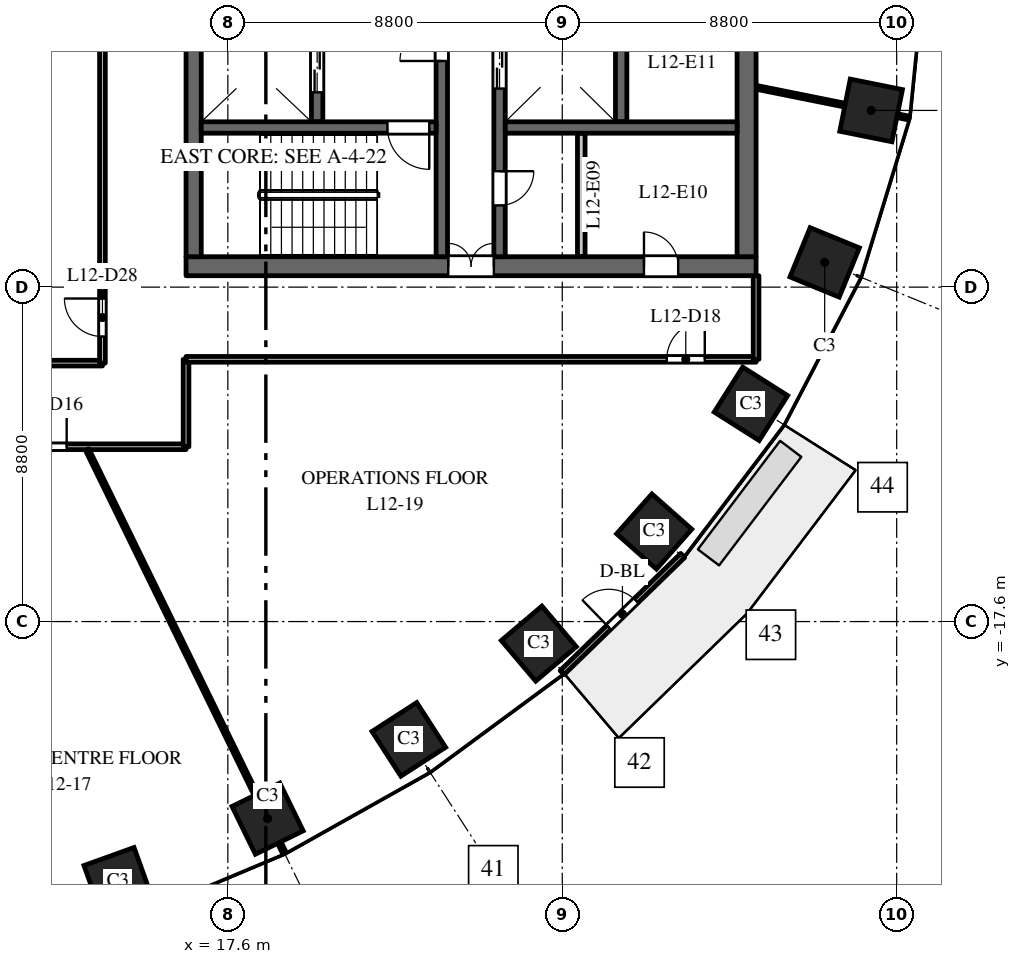
"""IFC4 building model, lengths in metres.
Left out: names, types, materials, properties, quantities, classifications, styles, units other than length and angle.
Written with IfcOpenShell. Run it as: python <this file> out.ifc"""

import sys

from ifc_helpers import new_model, si_unit, direction, frame, frame_2d, origin, origin_2d, place, context, subcontext, project, spatial, rectangle, extrude, element, fill, save


model = new_model("IFC4")
c1 = context("Model", 3, precision=1e-05, world=origin(), true_north=direction((0.0, 1.0)))
c2 = subcontext(c1, "Body", "Model", "MODEL_VIEW")
j1 = project(units=[si_unit("LENGTHUNIT", "METRE"), si_unit("PLANEANGLEUNIT", "RADIAN")], contexts=[c1])
p1 = place(None, origin())
s1 = spatial("IfcSite", under=j1, at=p1, CompositionType="ELEMENT")
p2 = place(p1, origin())
s2 = spatial("IfcBuilding", under=s1, at=p2, CompositionType="ELEMENT")
p3 = place(p2, frame((0.0, 0.0, 58.5)))
s3 = spatial("IfcBuildingStorey", under=s2, at=p3, CompositionType="ELEMENT", Elevation=58.5)
for number, where, z_axis, x_axis in (
    (1, (14.709, -24.441, 0.0), (0.0, 0.0, 1.0), (0.941, 0.338, 0.0)),
    (2, (18.646, -22.785, 0.0), (0.0, 0.0, 1.0), (0.898, 0.439, 0.0)),
    (3, (22.362, -20.7, 0.0), (0.0, 0.0, 1.0), (0.84, 0.542, 0.0)),
    (4, (25.783, -18.18, 0.0), (0.0, 0.0, 1.0), (0.763, 0.646, 0.0)),
    (5, (28.819, -15.23, 0.0), (0.0, 0.0, 1.0), (0.663, 0.749, 0.0)),
    (6, (31.365, -11.871, 0.0), (0.0, 0.0, 1.0), (0.535, 0.845, 0.0)),
    (7, (33.305, -8.149, 0.0), (0.0, 0.0, 1.0), (0.379, 0.925, 0.0)),
    (8, (34.527, -4.151, 0.0), (0.0, 0.0, 1.0), (0.197, 0.98, 0.0)),
):
    element("IfcColumn", number, at=place(p3, frame(where, z_axis=z_axis, x_axis=x_axis)), inside=s3, PredefinedType="COLUMN", context=c2, shape_type="SweptSolid", body=[
        extrude(rectangle(XDim=1.4, YDim=1.4, at=origin_2d()), origin(), (0.0, 0.0, 1.0), 4.0),
    ])
p4 = place(p3, frame((16.5, -8.25, 0.0), z_axis=(0.0, 0.0, 1.0), x_axis=(1.0, 0.0, 0.0)))
e9 = element("IfcWall", 9, at=p4, inside=s3, PredefinedType="SHEAR", context=c2, shape_type="SweptSolid", body=[
    extrude(rectangle(XDim=15.0, YDim=0.5, at=frame_2d((7.5, 0.0))), origin(), (0.0, 0.0, 1.0), 3.7),
])
p5 = place(p4, frame((6.9, 0.0, 0.0)))
e10 = element("IfcOpeningElement", 10, at=p5, cuts=e9, PredefinedType="OPENING", context=c2, shape_type="SweptSolid", body=[
    extrude(rectangle(XDim=1.2, YDim=2.1, at=frame_2d((0.6, 1.05))), frame((0.0, 0.26, 0.0), z_axis=(0.0, -1.0, 0.0), x_axis=(1.0, 0.0, 0.0)), (0.0, 0.0, 1.0), 0.52),
])
p6 = place(p4, frame((12.05, 0.0, 0.0)))
e11 = element("IfcOpeningElement", 11, at=p6, cuts=e9, PredefinedType="OPENING", context=c2, shape_type="SweptSolid", body=[
    extrude(rectangle(XDim=0.9, YDim=2.1, at=frame_2d((0.45, 1.05))), frame((0.0, 0.26, 0.0), z_axis=(0.0, -1.0, 0.0), x_axis=(1.0, 0.0, 0.0)), (0.0, 0.0, 1.0), 0.52),
])
p7 = place(p3, frame((27.95, -4.45, 0.0), z_axis=(0.0, 0.0, 1.0), x_axis=(0.0, 1.0, 0.0)))
e12 = element("IfcWall", 12, at=p7, inside=s3, PredefinedType="SHEAR", context=c2, shape_type="SweptSolid", body=[
    extrude(rectangle(XDim=8.9, YDim=0.3, at=frame_2d((4.45, 0.0))), origin(), (0.0, 0.0, 1.0), 3.7),
])
p8 = place(p3, frame((19.95, -4.45, 0.0), z_axis=(0.0, 0.0, 1.0), x_axis=(0.0, 1.0, 0.0)))
e13 = element("IfcWall", 13, at=p8, inside=s3, PredefinedType="SHEAR", context=c2, shape_type="SweptSolid", body=[
    extrude(rectangle(XDim=8.9, YDim=0.3, at=frame_2d((4.45, 0.0))), origin(), (0.0, 0.0, 1.0), 3.7),
])
p9 = place(p8, frame((0.775, 0.0, 0.0)))
e14 = element("IfcOpeningElement", 14, at=p9, cuts=e13, PredefinedType="OPENING", context=c2, shape_type="SweptSolid", body=[
    extrude(rectangle(XDim=1.2, YDim=2.1, at=frame_2d((0.6, 1.05))), frame((0.0, 0.16, 0.0), z_axis=(0.0, -1.0, 0.0), x_axis=(1.0, 0.0, 0.0)), (0.0, 0.0, 1.0), 0.32),
])
p10 = place(p8, frame((4.62, 0.0, 0.0)))
e15 = element("IfcOpeningElement", 15, at=p10, cuts=e13, PredefinedType="OPENING", context=c2, shape_type="SweptSolid", body=[
    extrude(rectangle(XDim=0.9, YDim=2.1, at=frame_2d((0.45, 1.05))), frame((0.0, 0.16, 0.0), z_axis=(0.0, -1.0, 0.0), x_axis=(1.0, 0.0, 0.0)), (0.0, 0.0, 1.0), 0.32),
])
p11 = place(p8, frame((6.1, 0.0, 0.0)))
e16 = element("IfcOpeningElement", 16, at=p11, cuts=e13, PredefinedType="OPENING", context=c2, shape_type="SweptSolid", body=[
    extrude(rectangle(XDim=0.9, YDim=2.1, at=frame_2d((0.45, 1.05))), frame((0.0, 0.16, 0.0), z_axis=(0.0, -1.0, 0.0), x_axis=(1.0, 0.0, 0.0)), (0.0, 0.0, 1.0), 0.32),
])
p12 = place(p8, frame((7.725, 0.0, 0.0)))
e17 = element("IfcOpeningElement", 17, at=p12, cuts=e13, PredefinedType="OPENING", context=c2, shape_type="SweptSolid", body=[
    extrude(rectangle(XDim=0.9, YDim=2.1, at=frame_2d((0.45, 1.05))), frame((0.0, 0.16, 0.0), z_axis=(0.0, -1.0, 0.0), x_axis=(1.0, 0.0, 0.0)), (0.0, 0.0, 1.0), 0.32),
])
p13 = place(p3, frame((24.75, -8.0, 0.0), z_axis=(0.0, 0.0, 1.0), x_axis=(0.0, 1.0, 0.0)))
e18 = element("IfcWall", 18, at=p13, inside=s3, PredefinedType="SHEAR", context=c2, shape_type="SweptSolid", body=[
    extrude(rectangle(XDim=16.0, YDim=0.3, at=frame_2d((8.0, 0.0))), origin(), (0.0, 0.0, 1.0), 3.7),
])
p14 = place(p13, frame((4.425, 0.0, 0.0)))
e19 = element("IfcOpeningElement", 19, at=p14, cuts=e18, PredefinedType="OPENING", context=c2, shape_type="SweptSolid", body=[
    extrude(rectangle(XDim=1.1, YDim=2.1, at=frame_2d((0.55, 1.05))), frame((0.0, 0.16, 0.0), z_axis=(0.0, -1.0, 0.0), x_axis=(1.0, 0.0, 0.0)), (0.0, 0.0, 1.0), 0.32),
])
p15 = place(p13, frame((7.45, 0.0, 0.0)))
e20 = element("IfcOpeningElement", 20, at=p15, cuts=e18, PredefinedType="OPENING", context=c2, shape_type="SweptSolid", body=[
    extrude(rectangle(XDim=1.1, YDim=2.1, at=frame_2d((0.55, 1.05))), frame((0.0, 0.16, 0.0), z_axis=(0.0, -1.0, 0.0), x_axis=(1.0, 0.0, 0.0)), (0.0, 0.0, 1.0), 0.32),
])
p16 = place(p13, frame((10.425, 0.0, 0.0)))
e21 = element("IfcOpeningElement", 21, at=p16, cuts=e18, PredefinedType="OPENING", context=c2, shape_type="SweptSolid", body=[
    extrude(rectangle(XDim=1.2, YDim=2.1, at=frame_2d((0.6, 1.05))), frame((0.0, 0.16, 0.0), z_axis=(0.0, -1.0, 0.0), x_axis=(1.0, 0.0, 0.0)), (0.0, 0.0, 1.0), 0.32),
])
p17 = place(p13, frame((13.75, 0.0, 0.0)))
e22 = element("IfcOpeningElement", 22, at=p17, cuts=e18, PredefinedType="OPENING", context=c2, shape_type="SweptSolid", body=[
    extrude(rectangle(XDim=0.9, YDim=2.1, at=frame_2d((0.45, 1.05))), frame((0.0, 0.16, 0.0), z_axis=(0.0, -1.0, 0.0), x_axis=(1.0, 0.0, 0.0)), (0.0, 0.0, 1.0), 0.32),
])
p18 = place(p13, frame((1.35, 0.0, 0.0)))
e23 = element("IfcOpeningElement", 23, at=p18, cuts=e18, PredefinedType="OPENING", context=c2, shape_type="SweptSolid", body=[
    extrude(rectangle(XDim=0.9, YDim=2.1, at=frame_2d((0.45, 1.05))), frame((0.0, 0.16, 0.0), z_axis=(0.0, -1.0, 0.0), x_axis=(1.0, 0.0, 0.0)), (0.0, 0.0, 1.0), 0.32),
])
p19 = place(p3, frame((16.7, -8.0, 0.0), z_axis=(0.0, 0.0, 1.0), x_axis=(0.0, 1.0, 0.0)))
e24 = element("IfcWall", 24, at=p19, inside=s3, PredefinedType="SHEAR", context=c2, shape_type="SweptSolid", body=[
    extrude(rectangle(XDim=16.0, YDim=0.4, at=frame_2d((8.0, 0.0))), origin(), (0.0, 0.0, 1.0), 3.7),
])
p20 = place(p3, frame((31.25, -8.0, 0.0), z_axis=(0.0, 0.0, 1.0), x_axis=(0.0, 1.0, 0.0)))
e25 = element("IfcWall", 25, at=p20, inside=s3, PredefinedType="SHEAR", context=c2, shape_type="SweptSolid", body=[
    extrude(rectangle(XDim=16.0, YDim=0.5, at=frame_2d((8.0, 0.0))), origin(), (0.0, 0.0, 1.0), 3.7),
])
p21 = place(p3, frame((26.9, -8.0, 0.0), z_axis=(0.0, 0.0, 1.0), x_axis=(0.0, 1.0, 0.0)))
e26 = element("IfcWall", 26, at=p21, inside=s3, PredefinedType="PARTITIONING", context=c2, shape_type="SweptSolid", body=[
    extrude(rectangle(XDim=3.25, YDim=0.2, at=frame_2d((1.625, 0.0))), origin(), (0.0, 0.0, 1.0), 3.7),
])
p22 = place(p3, frame((24.9, -4.6, 0.0), z_axis=(0.0, 0.0, 1.0), x_axis=(1.0, 0.0, 0.0)))
e27 = element("IfcWall", 27, at=p22, inside=s3, PredefinedType="SHEAR", context=c2, shape_type="SweptSolid", body=[
    extrude(rectangle(XDim=6.1, YDim=0.3, at=frame_2d((3.05, 0.0))), origin(), (0.0, 0.0, 1.0), 3.7),
])
p23 = place(p3, frame((23.23, -8.0, 0.0), z_axis=(0.0, 0.0, 1.0), x_axis=(0.0, 1.0, 0.0)))
e28 = element("IfcWall", 28, at=p23, inside=s3, PredefinedType="SHEAR", context=c2, shape_type="SweptSolid", body=[
    extrude(rectangle(XDim=7.875, YDim=0.3, at=frame_2d((3.938, 0.0))), origin(), (0.0, 0.0, 1.0), 3.7),
])
p24 = place(p23, frame((5.15, 0.0, 0.0)))
e29 = element("IfcOpeningElement", 29, at=p24, cuts=e28, PredefinedType="OPENING", context=c2, shape_type="SweptSolid", body=[
    extrude(rectangle(XDim=1.1, YDim=2.1, at=frame_2d((0.55, 1.05))), frame((0.0, 0.16, 0.0), z_axis=(0.0, -1.0, 0.0), x_axis=(1.0, 0.0, 0.0)), (0.0, 0.0, 1.0), 0.32),
])
p25 = place(p3, frame((16.9, -4.6, 0.0), z_axis=(0.0, 0.0, 1.0), x_axis=(1.0, 0.0, 0.0)))
e30 = element("IfcWall", 30, at=p25, inside=s3, PredefinedType="SHEAR", context=c2, shape_type="SweptSolid", body=[
    extrude(rectangle(XDim=6.18, YDim=0.3, at=frame_2d((3.09, 0.0))), origin(), (0.0, 0.0, 1.0), 3.7),
])
p26 = place(p25, frame((4.9, 0.0, 0.0)))
e31 = element("IfcOpeningElement", 31, at=p26, cuts=e30, PredefinedType="OPENING", context=c2, shape_type="SweptSolid", body=[
    extrude(rectangle(XDim=1.1, YDim=2.1, at=frame_2d((0.55, 1.05))), frame((0.0, 0.16, 0.0), z_axis=(0.0, -1.0, 0.0), x_axis=(1.0, 0.0, 0.0)), (0.0, 0.0, 1.0), 0.32),
])
p27 = place(p3, frame((26.396, -18.943, 0.0), z_axis=(0.0, 0.0, 1.0), x_axis=(0.717214761864, 0.696852197647, 0.0)))
e32 = element("IfcWall", 32, at=p27, inside=s3, PredefinedType="STANDARD", context=c2, shape_type="SweptSolid", body=[
    extrude(rectangle(XDim=4.424, YDim=0.15, at=frame_2d((2.212, 0.0))), origin(), (0.0, 0.0, 1.0), 3.7),
])
p28 = place(p27, frame((1.712, 0.0, 0.0)))
e33 = element("IfcOpeningElement", 33, at=p28, cuts=e32, PredefinedType="OPENING", context=c2, shape_type="SweptSolid", body=[
    extrude(rectangle(XDim=1.0, YDim=2.4, at=frame_2d((0.5, 1.2))), frame((0.0, 0.085, 0.0), z_axis=(0.0, -1.0, 0.0), x_axis=(1.0, 0.0, 0.0)), (0.0, 0.0, 1.0), 0.17),
])
p29 = place(p3, frame((-14.3, -10.8, 0.0), z_axis=(0.0, 0.0, 1.0), x_axis=(1.0, 0.0, 0.0)))
e34 = element("IfcWall", 34, at=p29, inside=s3, PredefinedType="PARTITIONING", context=c2, shape_type="SweptSolid", body=[
    extrude(rectangle(XDim=28.6, YDim=0.15, at=frame_2d((14.3, 0.0))), origin(), (0.0, 0.0, 1.0), 2.85),
])
p30 = place(p29, frame((13.127, 0.0, 0.0)))
e35 = element("IfcOpeningElement", 35, at=p30, cuts=e34, PredefinedType="OPENING", context=c2, shape_type="SweptSolid", body=[
    extrude(rectangle(XDim=1.0, YDim=2.1, at=frame_2d((0.5, 1.05))), frame((0.0, 0.085, 0.0), z_axis=(0.0, -1.0, 0.0), x_axis=(1.0, 0.0, 0.0)), (0.0, 0.0, 1.0), 0.17),
])
p31 = place(p29, frame((17.893, 0.0, 0.0)))
e36 = element("IfcOpeningElement", 36, at=p31, cuts=e34, PredefinedType="OPENING", context=c2, shape_type="SweptSolid", body=[
    extrude(rectangle(XDim=1.0, YDim=2.1, at=frame_2d((0.5, 1.05))), frame((0.0, 0.085, 0.0), z_axis=(0.0, -1.0, 0.0), x_axis=(1.0, 0.0, 0.0)), (0.0, 0.0, 1.0), 0.17),
])
p32 = place(p3, frame((4.479, -13.0, 0.0), z_axis=(0.0, 0.0, 1.0), x_axis=(1.0, 0.0, 0.0)))
e37 = element("IfcWall", 37, at=p32, inside=s3, PredefinedType="PARTITIONING", context=c2, shape_type="SweptSolid", body=[
    extrude(rectangle(XDim=12.021, YDim=0.15, at=frame_2d((6.01, 0.0))), origin(), (0.0, 0.0, 1.0), 2.85),
])
p33 = place(p32, frame((7.88, 0.0, 0.0)))
e38 = element("IfcOpeningElement", 38, at=p33, cuts=e37, PredefinedType="OPENING", context=c2, shape_type="SweptSolid", body=[
    extrude(rectangle(XDim=1.0, YDim=2.1, at=frame_2d((0.5, 1.05))), frame((0.0, 0.085, 0.0), z_axis=(0.0, -1.0, 0.0), x_axis=(1.0, 0.0, 0.0)), (0.0, 0.0, 1.0), 0.17),
])
p34 = place(p3, frame((13.899, -13.075, 0.0), z_axis=(0.0, 0.0, 1.0), x_axis=(0.439199750603, -0.898389436197, 0.0)))
e39 = element("IfcWall", 39, at=p34, inside=s3, PredefinedType="PARTITIONING", context=c2, shape_type="SweptSolid", body=[
    extrude(rectangle(XDim=11.81, YDim=0.1, at=frame_2d((5.905, 0.0))), origin(), (0.0, 0.0, 1.0), 2.85),
])
p35 = place(p3, frame((14.3, -10.8, 0.0), z_axis=(0.0, 0.0, 1.0), x_axis=(0.0, 1.0, 0.0)))
e40 = element("IfcWall", 40, at=p35, inside=s3, PredefinedType="PARTITIONING", context=c2, shape_type="SweptSolid", body=[
    extrude(rectangle(XDim=21.6, YDim=0.15, at=frame_2d((10.8, 0.0))), origin(), (0.0, 0.0, 1.0), 2.75),
])
p36 = place(p35, frame((0.7, 0.0, 0.0)))
e41 = element("IfcOpeningElement", 41, at=p36, cuts=e40, PredefinedType="OPENING", context=c2, shape_type="SweptSolid", body=[
    extrude(rectangle(XDim=1.0, YDim=2.1, at=frame_2d((0.5, 1.05))), frame((0.0, 0.085, 0.0), z_axis=(0.0, -1.0, 0.0), x_axis=(1.0, 0.0, 0.0)), (0.0, 0.0, 1.0), 0.17),
])
p37 = place(p3, frame((16.5, -13.0, 0.0), z_axis=(0.0, 0.0, 1.0), x_axis=(0.0, 1.0, 0.0)))
e42 = element("IfcWall", 42, at=p37, inside=s3, PredefinedType="PARTITIONING", context=c2, shape_type="SweptSolid", body=[
    extrude(rectangle(XDim=2.3, YDim=0.15, at=frame_2d((1.15, 0.0))), origin(), (0.0, 0.0, 1.0), 3.7),
])
p38 = place(p3, frame((16.5, -10.7, 0.0), z_axis=(0.0, 0.0, 1.0), x_axis=(1.0, 0.0, 0.0)))
e43 = element("IfcWall", 43, at=p38, inside=s3, PredefinedType="PARTITIONING", context=c2, shape_type="SweptSolid", body=[
    extrude(rectangle(XDim=15.0, YDim=0.15, at=frame_2d((7.5, 0.0))), origin(), (0.0, 0.0, 1.0), 2.75),
])
p39 = place(p38, frame((12.65, 0.0, 0.0)))
e44 = element("IfcOpeningElement", 44, at=p39, cuts=e43, PredefinedType="OPENING", context=c2, shape_type="SweptSolid", body=[
    extrude(rectangle(XDim=1.0, YDim=2.1, at=frame_2d((0.5, 1.05))), frame((0.0, 0.085, 0.0), z_axis=(0.0, -1.0, 0.0), x_axis=(1.0, 0.0, 0.0)), (0.0, 0.0, 1.0), 0.17),
])
p40 = place(p3, frame((31.5, -10.7, 0.0), z_axis=(0.0, 0.0, 1.0), x_axis=(0.0, 1.0, 0.0)))
e45 = element("IfcWall", 45, at=p40, inside=s3, PredefinedType="PARTITIONING", context=c2, shape_type="SweptSolid", body=[
    extrude(rectangle(XDim=2.2, YDim=0.15, at=frame_2d((1.1, 0.0))), origin(), (0.0, 0.0, 1.0), 2.85),
])
p41 = place(p3, frame((31.5, -3.542, 0.0), z_axis=(0.0, 0.0, 1.0), x_axis=(0.980357474535, -0.197228857227, 0.0)))
e46 = element("IfcWall", 46, at=p41, inside=s3, PredefinedType="PARTITIONING", context=c2, shape_type="SweptSolid", body=[
    extrude(rectangle(XDim=4.092, YDim=0.1, at=frame_2d((2.046, 0.0))), origin(), (0.0, 0.0, 1.0), 2.85),
])
p42 = place(p9, origin())
e47 = element("IfcDoor", 47, at=p42, inside=s3, OperationType="DOUBLE_DOOR_SLIDING", PredefinedType="DOOR", context=c2, shape_type="SweptSolid", body=[
    extrude(rectangle(XDim=1.2, YDim=2.1, at=frame_2d((0.6, 1.05))), frame((0.0, 0.025, 0.0), z_axis=(0.0, -1.0, 0.0), x_axis=(1.0, 0.0, 0.0)), (0.0, 0.0, 1.0), 0.05),
])
fill(e14, e47)
p43 = place(p14, origin())
e48 = element("IfcDoor", 48, at=p43, inside=s3, OperationType="DOUBLE_DOOR_SLIDING", PredefinedType="DOOR", context=c2, shape_type="SweptSolid", body=[
    extrude(rectangle(XDim=1.1, YDim=2.1, at=frame_2d((0.55, 1.05))), frame((0.0, 0.025, 0.0), z_axis=(0.0, -1.0, 0.0), x_axis=(1.0, 0.0, 0.0)), (0.0, 0.0, 1.0), 0.05),
])
fill(e19, e48)
p44 = place(p26, origin())
e49 = element("IfcDoor", 49, at=p44, inside=s3, OperationType="SINGLE_SWING_RIGHT", PredefinedType="DOOR", context=c2, shape_type="SweptSolid", body=[
    extrude(rectangle(XDim=1.1, YDim=2.1, at=frame_2d((0.55, 1.05))), frame((0.0, 0.025, 0.0), z_axis=(0.0, -1.0, 0.0), x_axis=(1.0, 0.0, 0.0)), (0.0, 0.0, 1.0), 0.05),
])
fill(e31, e49)
p45 = place(p24, origin())
e50 = element("IfcDoor", 50, at=p45, inside=s3, OperationType="SINGLE_SWING_RIGHT", PredefinedType="DOOR", context=c2, shape_type="SweptSolid", body=[
    extrude(rectangle(XDim=1.1, YDim=2.1, at=frame_2d((0.55, 1.05))), frame((0.0, 0.025, 0.0), z_axis=(0.0, -1.0, 0.0), x_axis=(1.0, 0.0, 0.0)), (0.0, 0.0, 1.0), 0.05),
])
fill(e29, e50)
p46 = place(p5, origin())
e51 = element("IfcDoor", 51, at=p46, inside=s3, OperationType="DOUBLE_DOOR_DOUBLE_SWING", PredefinedType="DOOR", context=c2, shape_type="SweptSolid", body=[
    extrude(rectangle(XDim=1.2, YDim=2.1, at=frame_2d((0.6, 1.05))), frame((0.0, 0.025, 0.0), z_axis=(0.0, -1.0, 0.0), x_axis=(1.0, 0.0, 0.0)), (0.0, 0.0, 1.0), 0.05),
])
fill(e10, e51)
p47 = place(p18, origin())
e52 = element("IfcDoor", 52, at=p47, inside=s3, OperationType="SINGLE_SWING_RIGHT", PredefinedType="DOOR", context=c2, shape_type="SweptSolid", body=[
    extrude(rectangle(XDim=0.9, YDim=2.1, at=frame_2d((0.45, 1.05))), frame((0.0, 0.025, 0.0), z_axis=(0.0, -1.0, 0.0), x_axis=(1.0, 0.0, 0.0)), (0.0, 0.0, 1.0), 0.05),
])
fill(e23, e52)
p48 = place(p6, origin())
e53 = element("IfcDoor", 53, at=p48, inside=s3, OperationType="SINGLE_SWING_RIGHT", PredefinedType="DOOR", context=c2, shape_type="SweptSolid", body=[
    extrude(rectangle(XDim=0.9, YDim=2.1, at=frame_2d((0.45, 1.05))), frame((0.0, 0.025, 0.0), z_axis=(0.0, -1.0, 0.0), x_axis=(1.0, 0.0, 0.0)), (0.0, 0.0, 1.0), 0.05),
])
fill(e11, e53)
p49 = place(p28, origin())
e54 = element("IfcDoor", 54, at=p49, inside=s3, OperationType="SINGLE_SWING_LEFT", PredefinedType="DOOR", context=c2, shape_type="SweptSolid", body=[
    extrude(rectangle(XDim=1.0, YDim=2.4, at=frame_2d((0.5, 1.2))), frame((0.0, 0.025, 0.0), z_axis=(0.0, -1.0, 0.0), x_axis=(1.0, 0.0, 0.0)), (0.0, 0.0, 1.0), 0.05),
])
fill(e33, e54)
p50 = place(p33, origin())
e55 = element("IfcDoor", 55, at=p50, inside=s3, OperationType="SINGLE_SWING_RIGHT", PredefinedType="DOOR", context=c2, shape_type="SweptSolid", body=[
    extrude(rectangle(XDim=1.0, YDim=2.1, at=frame_2d((0.5, 1.05))), frame((0.0, 0.025, 0.0), z_axis=(0.0, -1.0, 0.0), x_axis=(1.0, 0.0, 0.0)), (0.0, 0.0, 1.0), 0.05),
])
fill(e38, e55)
p51 = place(p39, origin())
e56 = element("IfcDoor", 56, at=p51, inside=s3, OperationType="SINGLE_SWING_RIGHT", PredefinedType="DOOR", context=c2, shape_type="SweptSolid", body=[
    extrude(rectangle(XDim=1.0, YDim=2.1, at=frame_2d((0.5, 1.05))), frame((0.0, 0.025, 0.0), z_axis=(0.0, -1.0, 0.0), x_axis=(1.0, 0.0, 0.0)), (0.0, 0.0, 1.0), 0.05),
])
fill(e44, e56)
p52 = place(p36, origin())
e57 = element("IfcDoor", 57, at=p52, inside=s3, OperationType="SINGLE_SWING_RIGHT", PredefinedType="DOOR", context=c2, shape_type="SweptSolid", body=[
    extrude(rectangle(XDim=1.0, YDim=2.1, at=frame_2d((0.5, 1.05))), frame((0.0, 0.025, 0.0), z_axis=(0.0, -1.0, 0.0), x_axis=(1.0, 0.0, 0.0)), (0.0, 0.0, 1.0), 0.05),
])
fill(e41, e57)
save(model, sys.argv[1])
